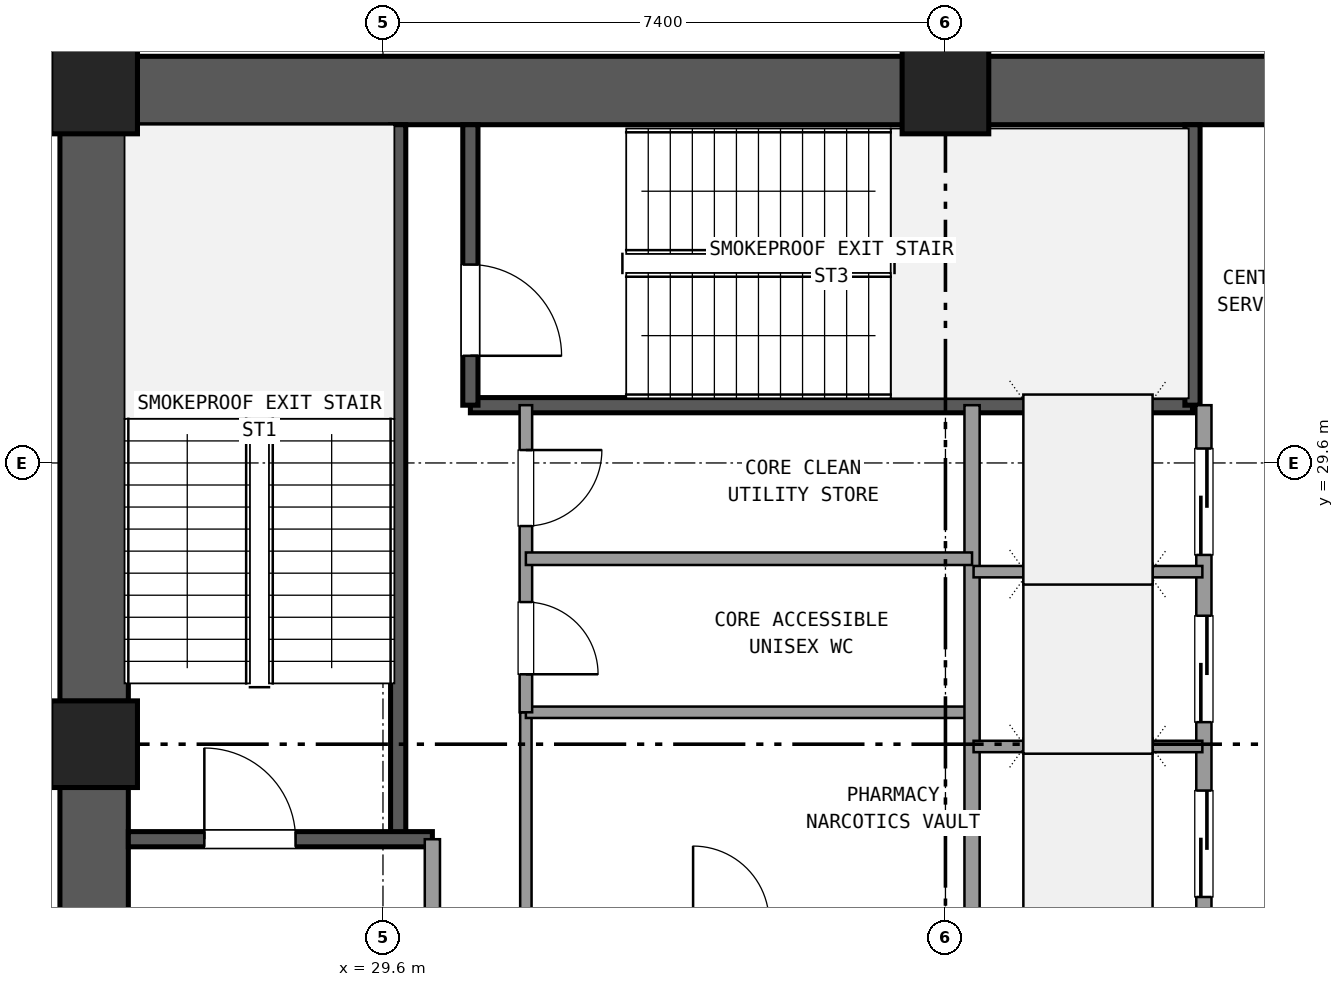
"""IFC4 building model, lengths in metres.
Left out: names, types, materials, properties, quantities, classifications, styles, units other than length and angle.
Written with IfcOpenShell. Run it as: python <this file> out.ifc"""

import sys

from ifc_helpers import new_model, si_unit, direction, frame, frame_2d, origin, origin_2d, place, context, subcontext, project, spatial, rectangle, extrude, element, fill, save


model = new_model("IFC4")
c1 = context("Model", 3, precision=1e-05, world=origin(), true_north=direction((0.0, 1.0)))
c2 = subcontext(c1, "Body", "Model", "MODEL_VIEW")
j1 = project(units=[si_unit("LENGTHUNIT", "METRE"), si_unit("PLANEANGLEUNIT", "RADIAN")], contexts=[c1])
p1 = place(None, origin())
s1 = spatial("IfcSite", under=j1, at=p1, CompositionType="ELEMENT")
p2 = place(p1, origin())
s2 = spatial("IfcBuilding", under=s1, at=p2, CompositionType="ELEMENT")
p3 = place(p2, frame((0.0, 0.0, -9.72)))
s3 = spatial("IfcBuildingStorey", under=s2, at=p3, CompositionType="ELEMENT", Elevation=-9.72)
for number, where, z_axis, x_axis in (
    (1, (37.0, 34.5, 0.0), (0.0, 0.0, 1.0), (1.0, 0.0, 0.0)),
    (2, (25.8, 34.5, 0.0), (0.0, 0.0, 1.0), (1.0, 0.0, 0.0)),
    (3, (25.8, 25.9, 0.0), (0.0, 0.0, 1.0), (1.0, 0.0, 0.0)),
):
    element("IfcColumn", number, at=place(p3, frame(where, z_axis=z_axis, x_axis=x_axis)), inside=s3, PredefinedType="COLUMN", context=c2, shape_type="SweptSolid", body=[
        extrude(rectangle(XDim=1.14, YDim=1.14, at=origin_2d()), origin(), (0.0, 0.0, 1.0), 4.86),
    ])
for number, where, z_axis, x_axis in (
    (4, (47.635, 34.5, 0.0), (0.0, 0.0, 1.0), (-1.0, 0.0, 0.0)),
    (5, (36.435, 34.5, 0.0), (0.0, 0.0, 1.0), (-1.0, 0.0, 0.0)),
):
    element("IfcWall", number, at=place(p3, frame(where, z_axis=z_axis, x_axis=x_axis)), inside=s3, PredefinedType="SHEAR", context=c2, shape_type="SweptSolid", body=[
        extrude(rectangle(XDim=10.07, YDim=0.9, at=frame_2d((5.035, 0.0))), origin(), (0.0, 0.0, 1.0), 4.56),
    ])
p4 = place(p3, frame((25.8, 33.935, 0.0), z_axis=(0.0, 0.0, 1.0), x_axis=(0.0, -1.0, 0.0)))
e6 = element("IfcWall", 6, at=p4, inside=s3, PredefinedType="SHEAR", context=c2, shape_type="SweptSolid", body=[
    extrude(rectangle(XDim=7.47, YDim=0.9, at=frame_2d((3.735, 0.0))), origin(), (0.0, 0.0, 1.0), 4.56),
])
p5 = place(p3, frame((25.8, 25.335, 0.0), z_axis=(0.0, 0.0, 1.0), x_axis=(0.0, -1.0, 0.0)))
e7 = element("IfcWall", 7, at=p5, inside=s3, PredefinedType="SHEAR", context=c2, shape_type="SweptSolid", body=[
    extrude(rectangle(XDim=7.47, YDim=0.9, at=frame_2d((3.735, 0.0))), origin(), (0.0, 0.0, 1.0), 4.56),
])
p6 = place(p5, frame((2.085, 0.0, 0.0)))
e8 = element("IfcOpeningElement", 8, at=p6, cuts=e7, PredefinedType="OPENING", context=c2, shape_type="SweptSolid", body=[
    extrude(rectangle(XDim=1.2, YDim=2.15, at=frame_2d((0.6, 1.075))), frame((0.0, 0.46, 0.0), z_axis=(0.0, -1.0, 0.0), x_axis=(1.0, 0.0, 0.0)), (0.0, 0.0, 1.0), 0.92),
])
p7 = place(p3, frame((29.8, 24.65, 0.0), z_axis=(0.0, 0.0, 1.0), x_axis=(0.0, 1.0, 0.0)))
e9 = element("IfcWall", 9, at=p7, inside=s3, PredefinedType="SHEAR", context=c2, shape_type="SweptSolid", body=[
    extrude(rectangle(XDim=9.4, YDim=0.2, at=frame_2d((4.7, 0.0))), origin(), (0.0, 0.0, 1.0), 4.56),
])
p8 = place(p3, frame((26.25, 24.65, 0.0), z_axis=(0.0, 0.0, 1.0), x_axis=(1.0, 0.0, 0.0)))
e10 = element("IfcWall", 10, at=p8, inside=s3, PredefinedType="SHEAR", context=c2, shape_type="SweptSolid", body=[
    extrude(rectangle(XDim=4.0, YDim=0.2, at=frame_2d((2.0, 0.0))), origin(), (0.0, 0.0, 1.0), 4.56),
])
p9 = place(p8, frame((1.0, 0.0, 0.0)))
e11 = element("IfcOpeningElement", 11, at=p9, cuts=e10, PredefinedType="OPENING", context=c2, shape_type="SweptSolid", body=[
    extrude(rectangle(XDim=1.2, YDim=2.15, at=frame_2d((0.6, 1.075))), frame((0.0, 0.11, 0.0), z_axis=(0.0, -1.0, 0.0), x_axis=(1.0, 0.0, 0.0)), (0.0, 0.0, 1.0), 0.22),
])
p10 = place(p3, frame((30.75, 30.36, 0.0), z_axis=(0.0, 0.0, 1.0), x_axis=(1.0, 0.0, 0.0)))
e12 = element("IfcWall", 12, at=p10, inside=s3, PredefinedType="SHEAR", context=c2, shape_type="SweptSolid", body=[
    extrude(rectangle(XDim=9.5, YDim=0.2, at=frame_2d((4.75, 0.0))), origin(), (0.0, 0.0, 1.0), 4.56),
])
p11 = place(p3, frame((30.75, 30.36, 0.0), z_axis=(0.0, 0.0, 1.0), x_axis=(0.0, 1.0, 0.0)))
e13 = element("IfcWall", 13, at=p11, inside=s3, PredefinedType="SHEAR", context=c2, shape_type="SweptSolid", body=[
    extrude(rectangle(XDim=3.69, YDim=0.2, at=frame_2d((1.845, 0.0))), origin(), (0.0, 0.0, 1.0), 4.56),
])
p12 = place(p11, frame((0.65, 0.0, 0.0)))
e14 = element("IfcOpeningElement", 14, at=p12, cuts=e13, PredefinedType="OPENING", context=c2, shape_type="SweptSolid", body=[
    extrude(rectangle(XDim=1.2, YDim=2.15, at=frame_2d((0.6, 1.075))), frame((0.0, 0.11, 0.0), z_axis=(0.0, -1.0, 0.0), x_axis=(1.0, 0.0, 0.0)), (0.0, 0.0, 1.0), 0.22),
])
p13 = place(p3, frame((40.25, 30.36, 0.0), z_axis=(0.0, 0.0, 1.0), x_axis=(0.0, 1.0, 0.0)))
e15 = element("IfcWall", 15, at=p13, inside=s3, PredefinedType="SHEAR", context=c2, shape_type="SweptSolid", body=[
    extrude(rectangle(XDim=3.69, YDim=0.2, at=frame_2d((1.845, 0.0))), origin(), (0.0, 0.0, 1.0), 4.56),
])
p14 = place(p3, frame((30.25, 17.75, 0.0), z_axis=(0.0, 0.0, 1.0), x_axis=(0.0, 1.0, 0.0)))
e16 = element("IfcWall", 16, at=p14, inside=s3, PredefinedType="SOLIDWALL", context=c2, shape_type="SweptSolid", body=[
    extrude(rectangle(XDim=6.9, YDim=0.2, at=frame_2d((3.45, 0.0))), origin(), (0.0, 0.0, 1.0), 3.85),
])
p15 = place(p14, frame((4.15, 0.0, 0.0)))
e17 = element("IfcOpeningElement", 17, at=p15, cuts=e16, PredefinedType="OPENING", context=c2, shape_type="SweptSolid", body=[
    extrude(rectangle(XDim=1.2, YDim=2.15, at=frame_2d((0.6, 1.075))), frame((0.0, 0.11, 0.0), z_axis=(0.0, -1.0, 0.0), x_axis=(1.0, 0.0, 0.0)), (0.0, 0.0, 1.0), 0.22),
])
p16 = place(p3, frame((31.48, 23.56, 0.0), z_axis=(0.0, 0.0, 1.0), x_axis=(0.0, 1.0, 0.0)))
e18 = element("IfcWall", 18, at=p16, inside=s3, PredefinedType="PARTITIONING", context=c2, shape_type="SweptSolid", body=[
    extrude(rectangle(XDim=2.76, YDim=0.15, at=frame_2d((1.38, 0.0))), origin(), (0.0, 0.0, 1.0), 3.85),
])
p17 = place(p3, frame((31.48, 26.32, 0.0), z_axis=(0.0, 0.0, 1.0), x_axis=(1.0, 0.0, 0.0)))
e19 = element("IfcWall", 19, at=p17, inside=s3, PredefinedType="PARTITIONING", context=c2, shape_type="SweptSolid", body=[
    extrude(rectangle(XDim=5.89, YDim=0.15, at=frame_2d((2.945, 0.0))), origin(), (0.0, 0.0, 1.0), 3.85),
])
p18 = place(p3, frame((37.35, 23.54, 0.0), z_axis=(0.0, 0.0, 1.0), x_axis=(0.0, 1.0, 0.0)))
e20 = element("IfcWall", 20, at=p18, inside=s3, PredefinedType="SOLIDWALL", context=c2, shape_type="SweptSolid", body=[
    extrude(rectangle(XDim=6.82, YDim=0.2, at=frame_2d((3.41, 0.0))), origin(), (0.0, 0.0, 1.0), 3.85),
])
p19 = place(p3, frame((40.4, 23.54, 0.0), z_axis=(0.0, 0.0, 1.0), x_axis=(0.0, 1.0, 0.0)))
e21 = element("IfcWall", 21, at=p19, inside=s3, PredefinedType="SOLIDWALL", context=c2, shape_type="SweptSolid", body=[
    extrude(rectangle(XDim=6.82, YDim=0.2, at=frame_2d((3.41, 0.0))), origin(), (0.0, 0.0, 1.0), 3.85),
])
p20 = place(p19, frame((0.35, 0.0, 0.0)))
e22 = element("IfcOpeningElement", 22, at=p20, cuts=e21, PredefinedType="OPENING", context=c2, shape_type="SweptSolid", body=[
    extrude(rectangle(XDim=1.4, YDim=2.2, at=frame_2d((0.7, 1.1))), frame((0.0, 0.11, 0.0), z_axis=(0.0, -1.0, 0.0), x_axis=(1.0, 0.0, 0.0)), (0.0, 0.0, 1.0), 0.22),
])
p21 = place(p19, frame((2.65, 0.0, 0.0)))
e23 = element("IfcOpeningElement", 23, at=p21, cuts=e21, PredefinedType="OPENING", context=c2, shape_type="SweptSolid", body=[
    extrude(rectangle(XDim=1.4, YDim=2.2, at=frame_2d((0.7, 1.1))), frame((0.0, 0.11, 0.0), z_axis=(0.0, -1.0, 0.0), x_axis=(1.0, 0.0, 0.0)), (0.0, 0.0, 1.0), 0.22),
])
p22 = place(p19, frame((4.85, 0.0, 0.0)))
e24 = element("IfcOpeningElement", 24, at=p22, cuts=e21, PredefinedType="OPENING", context=c2, shape_type="SweptSolid", body=[
    extrude(rectangle(XDim=1.4, YDim=2.2, at=frame_2d((0.7, 1.1))), frame((0.0, 0.11, 0.0), z_axis=(0.0, -1.0, 0.0), x_axis=(1.0, 0.0, 0.0)), (0.0, 0.0, 1.0), 0.22),
])
for number, where, z_axis, x_axis in (
    (25, (37.37, 25.87, 0.0), (0.0, 0.0, 1.0), (1.0, 0.0, 0.0)),
    (26, (37.37, 28.17, 0.0), (0.0, 0.0, 1.0), (1.0, 0.0, 0.0)),
):
    element("IfcWall", number, at=place(p3, frame(where, z_axis=z_axis, x_axis=x_axis)), inside=s3, PredefinedType="PARTITIONING", context=c2, shape_type="SweptSolid", body=[
        extrude(rectangle(XDim=3.01, YDim=0.15, at=frame_2d((1.505, 0.0))), origin(), (0.0, 0.0, 1.0), 3.85),
    ])
p23 = place(p3, frame((31.48, 26.32, 0.0), z_axis=(0.0, 0.0, 1.0), x_axis=(0.0, 1.0, 0.0)))
e27 = element("IfcWall", 27, at=p23, inside=s3, PredefinedType="PLUMBINGWALL", context=c2, shape_type="SweptSolid", body=[
    extrude(rectangle(XDim=4.04, YDim=0.165, at=frame_2d((2.02, 0.0))), origin(), (0.0, 0.0, 1.0), 3.85),
])
p24 = place(p23, frame((0.5, 0.0, 0.0)))
e28 = element("IfcOpeningElement", 28, at=p24, cuts=e27, PredefinedType="OPENING", context=c2, shape_type="SweptSolid", body=[
    extrude(rectangle(XDim=0.95, YDim=2.1, at=frame_2d((0.475, 1.05))), frame((0.0, 0.093, 0.0), z_axis=(0.0, -1.0, 0.0), x_axis=(1.0, 0.0, 0.0)), (0.0, 0.0, 1.0), 0.185),
])
p25 = place(p23, frame((2.45, 0.0, 0.0)))
e29 = element("IfcOpeningElement", 29, at=p25, cuts=e27, PredefinedType="OPENING", context=c2, shape_type="SweptSolid", body=[
    extrude(rectangle(XDim=1.0, YDim=2.15, at=frame_2d((0.5, 1.075))), frame((0.0, 0.093, 0.0), z_axis=(0.0, -1.0, 0.0), x_axis=(1.0, 0.0, 0.0)), (0.0, 0.0, 1.0), 0.185),
])
p26 = place(p3, frame((31.48, 28.34, 0.0), z_axis=(0.0, 0.0, 1.0), x_axis=(1.0, 0.0, 0.0)))
e30 = element("IfcWall", 30, at=p26, inside=s3, PredefinedType="PLUMBINGWALL", context=c2, shape_type="SweptSolid", body=[
    extrude(rectangle(XDim=5.87, YDim=0.165, at=frame_2d((2.935, 0.0))), origin(), (0.0, 0.0, 1.0), 3.85),
])
p27 = place(p9, origin())
e31 = element("IfcDoor", 31, at=p27, inside=s3, OperationType="SINGLE_SWING_LEFT", PredefinedType="DOOR", context=c2, shape_type="SweptSolid", body=[
    extrude(rectangle(XDim=1.2, YDim=2.15, at=frame_2d((0.6, 1.075))), frame((0.0, 0.025, 0.0), z_axis=(0.0, -1.0, 0.0), x_axis=(1.0, 0.0, 0.0)), (0.0, 0.0, 1.0), 0.05),
])
fill(e11, e31)
p28 = place(p20, origin())
e32 = element("IfcDoor", 32, at=p28, inside=s3, OperationType="SLIDING_TO_LEFT", PredefinedType="DOOR", context=c2, shape_type="SweptSolid", body=[
    extrude(rectangle(XDim=1.4, YDim=2.2, at=frame_2d((0.7, 1.1))), frame((0.0, 0.025, 0.0), z_axis=(0.0, -1.0, 0.0), x_axis=(1.0, 0.0, 0.0)), (0.0, 0.0, 1.0), 0.05),
])
fill(e22, e32)
p29 = place(p21, origin())
e33 = element("IfcDoor", 33, at=p29, inside=s3, OperationType="SLIDING_TO_LEFT", PredefinedType="DOOR", context=c2, shape_type="SweptSolid", body=[
    extrude(rectangle(XDim=1.4, YDim=2.2, at=frame_2d((0.7, 1.1))), frame((0.0, 0.025, 0.0), z_axis=(0.0, -1.0, 0.0), x_axis=(1.0, 0.0, 0.0)), (0.0, 0.0, 1.0), 0.05),
])
fill(e23, e33)
p30 = place(p22, origin())
e34 = element("IfcDoor", 34, at=p30, inside=s3, OperationType="SLIDING_TO_RIGHT", PredefinedType="DOOR", context=c2, shape_type="SweptSolid", body=[
    extrude(rectangle(XDim=1.4, YDim=2.2, at=frame_2d((0.7, 1.1))), frame((0.0, 0.025, 0.0), z_axis=(0.0, -1.0, 0.0), x_axis=(1.0, 0.0, 0.0)), (0.0, 0.0, 1.0), 0.05),
])
fill(e24, e34)
p31 = place(p12, frame((1.2, 0.0, 0.0), z_axis=(0.0, 0.0, 1.0), x_axis=(-1.0, 0.0, 0.0)))
e35 = element("IfcDoor", 35, at=p31, inside=s3, OperationType="SINGLE_SWING_LEFT", PredefinedType="DOOR", context=c2, shape_type="SweptSolid", body=[
    extrude(rectangle(XDim=1.2, YDim=2.15, at=frame_2d((0.6, 1.075))), frame((0.0, 0.025, 0.0), z_axis=(0.0, -1.0, 0.0), x_axis=(1.0, 0.0, 0.0)), (0.0, 0.0, 1.0), 0.05),
])
fill(e14, e35)
p32 = place(p24, frame((0.95, 0.0, 0.0), z_axis=(0.0, 0.0, 1.0), x_axis=(-1.0, 0.0, 0.0)))
e36 = element("IfcDoor", 36, at=p32, inside=s3, OperationType="SINGLE_SWING_LEFT", PredefinedType="DOOR", context=c2, shape_type="SweptSolid", body=[
    extrude(rectangle(XDim=0.95, YDim=2.1, at=frame_2d((0.475, 1.05))), frame((0.0, 0.025, 0.0), z_axis=(0.0, -1.0, 0.0), x_axis=(1.0, 0.0, 0.0)), (0.0, 0.0, 1.0), 0.05),
])
fill(e28, e36)
p33 = place(p25, frame((1.0, 0.0, 0.0), z_axis=(0.0, 0.0, 1.0), x_axis=(-1.0, 0.0, 0.0)))
e37 = element("IfcDoor", 37, at=p33, inside=s3, OperationType="SINGLE_SWING_RIGHT", PredefinedType="DOOR", context=c2, shape_type="SweptSolid", body=[
    extrude(rectangle(XDim=1.0, YDim=2.15, at=frame_2d((0.5, 1.075))), frame((0.0, 0.025, 0.0), z_axis=(0.0, -1.0, 0.0), x_axis=(1.0, 0.0, 0.0)), (0.0, 0.0, 1.0), 0.05),
])
fill(e29, e37)
save(model, sys.argv[1])
